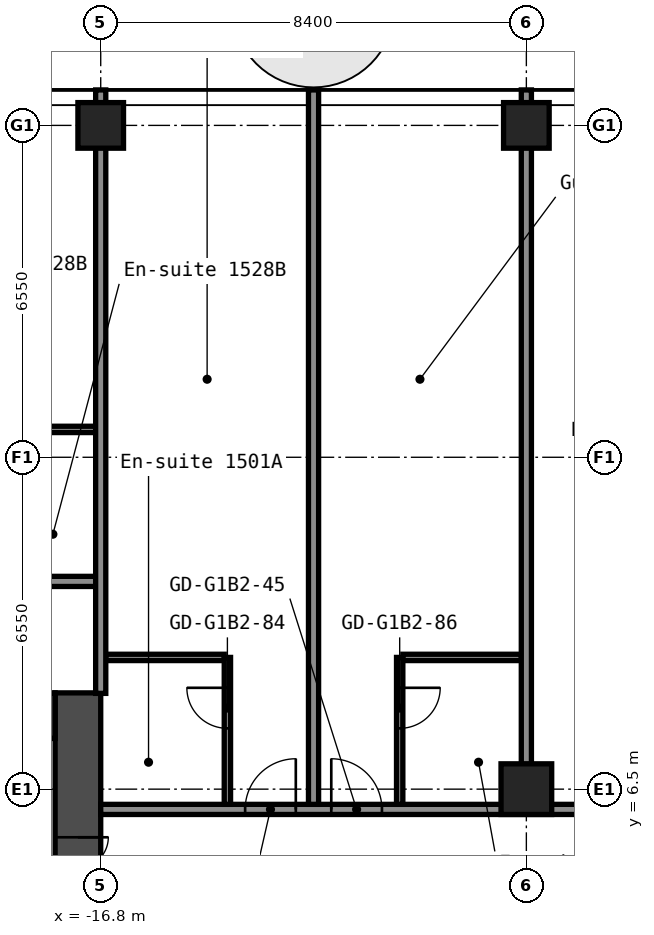
"""IFC4 building model, lengths in metres.
Left out: names, types, materials, properties, quantities, classifications, styles, units other than length and angle.
Written with IfcOpenShell. Run it as: python <this file> out.ifc"""

import sys

from ifc_helpers import new_model, si_unit, direction, frame, frame_2d, origin, origin_2d, place, context, subcontext, project, spatial, rectangle, hollow_rectangle, extrude, element, fill, save


model = new_model("IFC4")
c1 = context("Model", 3, precision=1e-05, world=origin(), true_north=direction((0.0, 1.0)))
c2 = subcontext(c1, "Body", "Model", "MODEL_VIEW")
j1 = project(units=[si_unit("LENGTHUNIT", "METRE"), si_unit("PLANEANGLEUNIT", "RADIAN")], contexts=[c1])
p1 = place(None, origin())
s1 = spatial("IfcSite", under=j1, at=p1, CompositionType="ELEMENT")
p2 = place(p1, origin())
s2 = spatial("IfcBuilding", under=s1, at=p2, CompositionType="ELEMENT")
p3 = place(p2, frame((0.0, 0.0, 55.0)))
s3 = spatial("IfcBuildingStorey", under=s2, at=p3, CompositionType="ELEMENT", Elevation=55.0)
p4 = place(p3, frame((-16.8, 19.6, 0.0), z_axis=(0.0, 0.0, 1.0), x_axis=(1.0, 0.0, 0.0)))
e1 = element("IfcColumn", 1, at=p4, inside=s3, PredefinedType="COLUMN", context=c2, shape_type="SweptSolid", body=[
    extrude(hollow_rectangle(XDim=0.9, YDim=0.9, WallThickness=0.036, at=origin_2d()), origin(), (0.0, 0.0, 1.0), 2.8),
])
p5 = place(p3, frame((-8.4, 6.5, 0.0), z_axis=(0.0, 0.0, 1.0), x_axis=(1.0, 0.0, 0.0)))
e2 = element("IfcColumn", 2, at=p5, inside=s3, PredefinedType="COLUMN", context=c2, shape_type="SweptSolid", body=[
    extrude(hollow_rectangle(XDim=1.0, YDim=1.0, WallThickness=0.04, at=origin_2d()), origin(), (0.0, 0.0, 1.0), 2.8),
])
p6 = place(p3, frame((-8.4, 19.6, 0.0), z_axis=(0.0, 0.0, 1.0), x_axis=(1.0, 0.0, 0.0)))
e3 = element("IfcColumn", 3, at=p6, inside=s3, PredefinedType="COLUMN", context=c2, shape_type="SweptSolid", body=[
    extrude(hollow_rectangle(XDim=0.9, YDim=0.9, WallThickness=0.036, at=origin_2d()), origin(), (0.0, 0.0, 1.0), 2.8),
])
p7 = place(p3, frame((-17.25, -8.4, 0.0), z_axis=(0.0, 0.0, 1.0), x_axis=(0.0, 1.0, 0.0)))
e4 = element("IfcWall", 4, at=p7, inside=s3, PredefinedType="SHEAR", context=c2, shape_type="SweptSolid", body=[
    extrude(rectangle(XDim=16.8, YDim=0.9, at=frame_2d((8.4, 0.0))), origin(), (0.0, 0.0, 1.0), 2.8),
])
p8 = place(p7, frame((12.75, 0.0, 0.0)))
e5 = element("IfcOpeningElement", 5, at=p8, cuts=e4, PredefinedType="OPENING", context=c2, shape_type="SweptSolid", body=[
    extrude(rectangle(XDim=1.2, YDim=2.1, at=frame_2d((0.6, 1.05))), frame((0.0, 0.46, 0.0), z_axis=(0.0, -1.0, 0.0), x_axis=(1.0, 0.0, 0.0)), (0.0, 0.0, 1.0), 0.92),
])
p9 = place(p7, frame((2.85, 0.0, 0.0)))
e6 = element("IfcOpeningElement", 6, at=p9, cuts=e4, PredefinedType="OPENING", context=c2, shape_type="SweptSolid", body=[
    extrude(rectangle(XDim=1.2, YDim=2.1, at=frame_2d((0.6, 1.05))), frame((0.0, 0.46, 0.0), z_axis=(0.0, -1.0, 0.0), x_axis=(1.0, 0.0, 0.0)), (0.0, 0.0, 1.0), 0.92),
])
p10 = place(p3, frame((-32.7, 7.95, 0.0), z_axis=(0.0, 0.0, 1.0), x_axis=(1.0, 0.0, 0.0)))
e7 = element("IfcWall", 7, at=p10, inside=s3, PredefinedType="SHEAR", context=c2, shape_type="SweptSolid", body=[
    extrude(rectangle(XDim=15.0, YDim=0.9, at=frame_2d((7.5, 0.0))), origin(), (0.0, 0.0, 1.0), 2.8),
])
p11 = place(p10, frame((3.4, 0.0, 0.0)))
e8 = element("IfcOpeningElement", 8, at=p11, cuts=e7, PredefinedType="OPENING", context=c2, shape_type="SweptSolid", body=[
    extrude(rectangle(XDim=1.2, YDim=2.1, at=frame_2d((0.6, 1.05))), frame((0.0, 0.46, 0.0), z_axis=(0.0, -1.0, 0.0), x_axis=(1.0, 0.0, 0.0)), (0.0, 0.0, 1.0), 0.92),
])
p12 = place(p10, frame((0.75, 0.0, 0.0)))
e9 = element("IfcOpeningElement", 9, at=p12, cuts=e7, PredefinedType="OPENING", context=c2, shape_type="SweptSolid", body=[
    extrude(rectangle(XDim=0.9, YDim=2.1, at=frame_2d((0.45, 1.05))), frame((0.0, 0.46, 0.0), z_axis=(0.0, -1.0, 0.0), x_axis=(1.0, 0.0, 0.0)), (0.0, 0.0, 1.0), 0.92),
])
p13 = place(p3, frame((-16.8, 6.1, 0.0), z_axis=(0.0, 0.0, 1.0), x_axis=(1.0, 0.0, 0.0)))
e10 = element("IfcWall", 10, at=p13, inside=s3, PredefinedType="PARTITIONING", context=c2, shape_type="SweptSolid", body=[
    extrude(rectangle(XDim=33.6, YDim=0.2, at=frame_2d((16.8, 0.0))), origin(), (0.0, 0.0, 1.0), 2.8),
])
p14 = place(p13, frame((2.85, 0.0, 0.0)))
e11 = element("IfcOpeningElement", 11, at=p14, cuts=e10, PredefinedType="OPENING", context=c2, shape_type="SweptSolid", body=[
    extrude(rectangle(XDim=1.0, YDim=2.1, at=frame_2d((0.5, 1.05))), frame((0.0, 0.11, 0.0), z_axis=(0.0, -1.0, 0.0), x_axis=(1.0, 0.0, 0.0)), (0.0, 0.0, 1.0), 0.22),
])
p15 = place(p13, frame((4.55, 0.0, 0.0)))
e12 = element("IfcOpeningElement", 12, at=p15, cuts=e10, PredefinedType="OPENING", context=c2, shape_type="SweptSolid", body=[
    extrude(rectangle(XDim=1.0, YDim=2.1, at=frame_2d((0.5, 1.05))), frame((0.0, 0.11, 0.0), z_axis=(0.0, -1.0, 0.0), x_axis=(1.0, 0.0, 0.0)), (0.0, 0.0, 1.0), 0.22),
])
p16 = place(p13, frame((10.555, 0.0, 0.0)))
e13 = element("IfcOpeningElement", 13, at=p16, cuts=e10, PredefinedType="OPENING", context=c2, shape_type="SweptSolid", body=[
    extrude(rectangle(XDim=0.9, YDim=2.1, at=frame_2d((0.45, 1.05))), frame((0.0, 0.11, 0.0), z_axis=(0.0, -1.0, 0.0), x_axis=(1.0, 0.0, 0.0)), (0.0, 0.0, 1.0), 0.22),
])
p17 = place(p13, frame((14.755, 0.0, 0.0)))
e14 = element("IfcOpeningElement", 14, at=p17, cuts=e10, PredefinedType="OPENING", context=c2, shape_type="SweptSolid", body=[
    extrude(rectangle(XDim=0.9, YDim=2.1, at=frame_2d((0.45, 1.05))), frame((0.0, 0.11, 0.0), z_axis=(0.0, -1.0, 0.0), x_axis=(1.0, 0.0, 0.0)), (0.0, 0.0, 1.0), 0.22),
])
p18 = place(p13, frame((19.65, 0.0, 0.0)))
e15 = element("IfcOpeningElement", 15, at=p18, cuts=e10, PredefinedType="OPENING", context=c2, shape_type="SweptSolid", body=[
    extrude(rectangle(XDim=1.0, YDim=2.1, at=frame_2d((0.5, 1.05))), frame((0.0, 0.11, 0.0), z_axis=(0.0, -1.0, 0.0), x_axis=(1.0, 0.0, 0.0)), (0.0, 0.0, 1.0), 0.22),
])
p19 = place(p13, frame((21.35, 0.0, 0.0)))
e16 = element("IfcOpeningElement", 16, at=p19, cuts=e10, PredefinedType="OPENING", context=c2, shape_type="SweptSolid", body=[
    extrude(rectangle(XDim=1.0, YDim=2.1, at=frame_2d((0.5, 1.05))), frame((0.0, 0.11, 0.0), z_axis=(0.0, -1.0, 0.0), x_axis=(1.0, 0.0, 0.0)), (0.0, 0.0, 1.0), 0.22),
])
p20 = place(p13, frame((28.05, 0.0, 0.0)))
e17 = element("IfcOpeningElement", 17, at=p20, cuts=e10, PredefinedType="OPENING", context=c2, shape_type="SweptSolid", body=[
    extrude(rectangle(XDim=1.0, YDim=2.1, at=frame_2d((0.5, 1.05))), frame((0.0, 0.11, 0.0), z_axis=(0.0, -1.0, 0.0), x_axis=(1.0, 0.0, 0.0)), (0.0, 0.0, 1.0), 0.22),
])
p21 = place(p13, frame((29.75, 0.0, 0.0)))
e18 = element("IfcOpeningElement", 18, at=p21, cuts=e10, PredefinedType="OPENING", context=c2, shape_type="SweptSolid", body=[
    extrude(rectangle(XDim=1.0, YDim=2.1, at=frame_2d((0.5, 1.05))), frame((0.0, 0.11, 0.0), z_axis=(0.0, -1.0, 0.0), x_axis=(1.0, 0.0, 0.0)), (0.0, 0.0, 1.0), 0.22),
])
for number, where, z_axis, x_axis in (
    (19, (-16.7, 9.1, 0.0), (0.0, 0.0, 1.0), (1.0, 0.0, 0.0)),
    (20, (-10.837, 9.1, 0.0), (0.0, 0.0, 1.0), (1.0, 0.0, 0.0)),
):
    element("IfcWall", number, at=place(p3, frame(where, z_axis=z_axis, x_axis=x_axis)), inside=s3, PredefinedType="PARTITIONING", context=c2, shape_type="SweptSolid", body=[
        extrude(rectangle(XDim=2.337, YDim=0.125, at=frame_2d((1.169, 0.0))), origin(), (0.0, 0.0, 1.0), 2.8),
    ])
p22 = place(p3, frame((-51.1, 10.6, 0.0), z_axis=(0.0, 0.0, 1.0), x_axis=(1.0, 0.0, 0.0)))
e21 = element("IfcWall", 21, at=p22, inside=s3, PredefinedType="PARTITIONING", context=c2, shape_type="SweptSolid", body=[
    extrude(rectangle(XDim=34.3, YDim=0.2, at=frame_2d((17.15, 0.0))), origin(), (0.0, 0.0, 1.0), 2.8),
])
p23 = place(p22, frame((3.25, 0.0, 0.0)))
e22 = element("IfcOpeningElement", 22, at=p23, cuts=e21, PredefinedType="OPENING", context=c2, shape_type="SweptSolid", body=[
    extrude(rectangle(XDim=1.0, YDim=2.1, at=frame_2d((0.5, 1.05))), frame((0.0, 0.11, 0.0), z_axis=(0.0, -1.0, 0.0), x_axis=(1.0, 0.0, 0.0)), (0.0, 0.0, 1.0), 0.22),
])
p24 = place(p22, frame((5.15, 0.0, 0.0)))
e23 = element("IfcOpeningElement", 23, at=p24, cuts=e21, PredefinedType="OPENING", context=c2, shape_type="SweptSolid", body=[
    extrude(rectangle(XDim=1.0, YDim=2.1, at=frame_2d((0.5, 1.05))), frame((0.0, 0.11, 0.0), z_axis=(0.0, -1.0, 0.0), x_axis=(1.0, 0.0, 0.0)), (0.0, 0.0, 1.0), 0.22),
])
p25 = place(p22, frame((11.95, 0.0, 0.0)))
e24 = element("IfcOpeningElement", 24, at=p25, cuts=e21, PredefinedType="OPENING", context=c2, shape_type="SweptSolid", body=[
    extrude(rectangle(XDim=1.0, YDim=2.1, at=frame_2d((0.5, 1.05))), frame((0.0, 0.11, 0.0), z_axis=(0.0, -1.0, 0.0), x_axis=(1.0, 0.0, 0.0)), (0.0, 0.0, 1.0), 0.22),
])
p26 = place(p22, frame((13.65, 0.0, 0.0)))
e25 = element("IfcOpeningElement", 25, at=p26, cuts=e21, PredefinedType="OPENING", context=c2, shape_type="SweptSolid", body=[
    extrude(rectangle(XDim=1.0, YDim=2.1, at=frame_2d((0.5, 1.05))), frame((0.0, 0.11, 0.0), z_axis=(0.0, -1.0, 0.0), x_axis=(1.0, 0.0, 0.0)), (0.0, 0.0, 1.0), 0.22),
])
p27 = place(p22, frame((20.35, 0.0, 0.0)))
e26 = element("IfcOpeningElement", 26, at=p27, cuts=e21, PredefinedType="OPENING", context=c2, shape_type="SweptSolid", body=[
    extrude(rectangle(XDim=1.0, YDim=2.1, at=frame_2d((0.5, 1.05))), frame((0.0, 0.11, 0.0), z_axis=(0.0, -1.0, 0.0), x_axis=(1.0, 0.0, 0.0)), (0.0, 0.0, 1.0), 0.22),
])
p28 = place(p22, frame((22.05, 0.0, 0.0)))
e27 = element("IfcOpeningElement", 27, at=p28, cuts=e21, PredefinedType="OPENING", context=c2, shape_type="SweptSolid", body=[
    extrude(rectangle(XDim=1.0, YDim=2.1, at=frame_2d((0.5, 1.05))), frame((0.0, 0.11, 0.0), z_axis=(0.0, -1.0, 0.0), x_axis=(1.0, 0.0, 0.0)), (0.0, 0.0, 1.0), 0.22),
])
p29 = place(p22, frame((28.75, 0.0, 0.0)))
e28 = element("IfcOpeningElement", 28, at=p29, cuts=e21, PredefinedType="OPENING", context=c2, shape_type="SweptSolid", body=[
    extrude(rectangle(XDim=1.0, YDim=2.1, at=frame_2d((0.5, 1.05))), frame((0.0, 0.11, 0.0), z_axis=(0.0, -1.0, 0.0), x_axis=(1.0, 0.0, 0.0)), (0.0, 0.0, 1.0), 0.22),
])
p30 = place(p22, frame((30.45, 0.0, 0.0)))
e29 = element("IfcOpeningElement", 29, at=p30, cuts=e21, PredefinedType="OPENING", context=c2, shape_type="SweptSolid", body=[
    extrude(rectangle(XDim=1.0, YDim=2.1, at=frame_2d((0.5, 1.05))), frame((0.0, 0.11, 0.0), z_axis=(0.0, -1.0, 0.0), x_axis=(1.0, 0.0, 0.0)), (0.0, 0.0, 1.0), 0.22),
])
p31 = place(p3, frame((-19.238, 13.6, 0.0), z_axis=(0.0, 0.0, 1.0), x_axis=(1.0, 0.0, 0.0)))
e30 = element("IfcWall", 30, at=p31, inside=s3, PredefinedType="PARTITIONING", context=c2, shape_type="SweptSolid", body=[
    extrude(rectangle(XDim=2.338, YDim=0.125, at=frame_2d((1.169, 0.0))), origin(), (0.0, 0.0, 1.0), 2.8),
])
p32 = place(p3, frame((-16.8, 8.39, 0.0), z_axis=(0.0, 0.0, 1.0), x_axis=(0.0, 1.0, 0.0)))
e31 = element("IfcWall", 31, at=p32, inside=s3, PredefinedType="PARTITIONING", context=c2, shape_type="SweptSolid", body=[
    extrude(rectangle(XDim=11.91, YDim=0.2, at=frame_2d((5.955, 0.0))), origin(), (0.0, 0.0, 1.0), 2.8),
])
p33 = place(p3, frame((-14.3, 6.2, 0.0), z_axis=(0.0, 0.0, 1.0), x_axis=(0.0, 1.0, 0.0)))
e32 = element("IfcWall", 32, at=p33, inside=s3, PredefinedType="PARTITIONING", context=c2, shape_type="SweptSolid", body=[
    extrude(rectangle(XDim=2.9, YDim=0.125, at=frame_2d((1.45, 0.0))), origin(), (0.0, 0.0, 1.0), 2.8),
])
p34 = place(p33, frame((1.5, 0.0, 0.0)))
e33 = element("IfcOpeningElement", 33, at=p34, cuts=e32, PredefinedType="OPENING", context=c2, shape_type="SweptSolid", body=[
    extrude(rectangle(XDim=0.8, YDim=2.1, at=frame_2d((0.4, 1.05))), frame((0.0, 0.073, 0.0), z_axis=(0.0, -1.0, 0.0), x_axis=(1.0, 0.0, 0.0)), (0.0, 0.0, 1.0), 0.145),
])
p35 = place(p3, frame((-12.6, 6.2, 0.0), z_axis=(0.0, 0.0, 1.0), x_axis=(0.0, 1.0, 0.0)))
e34 = element("IfcWall", 34, at=p35, inside=s3, PredefinedType="PARTITIONING", context=c2, shape_type="SweptSolid", body=[
    extrude(rectangle(XDim=14.1, YDim=0.2, at=frame_2d((7.05, 0.0))), origin(), (0.0, 0.0, 1.0), 2.8),
])
p36 = place(p3, frame((-10.9, 6.2, 0.0), z_axis=(0.0, 0.0, 1.0), x_axis=(0.0, 1.0, 0.0)))
e35 = element("IfcWall", 35, at=p36, inside=s3, PredefinedType="PARTITIONING", context=c2, shape_type="SweptSolid", body=[
    extrude(rectangle(XDim=2.9, YDim=0.125, at=frame_2d((1.45, 0.0))), origin(), (0.0, 0.0, 1.0), 2.8),
])
p37 = place(p36, frame((1.5, 0.0, 0.0)))
e36 = element("IfcOpeningElement", 36, at=p37, cuts=e35, PredefinedType="OPENING", context=c2, shape_type="SweptSolid", body=[
    extrude(rectangle(XDim=0.8, YDim=2.1, at=frame_2d((0.4, 1.05))), frame((0.0, 0.073, 0.0), z_axis=(0.0, -1.0, 0.0), x_axis=(1.0, 0.0, 0.0)), (0.0, 0.0, 1.0), 0.145),
])
p38 = place(p3, frame((-8.4, 6.99, 0.0), z_axis=(0.0, 0.0, 1.0), x_axis=(0.0, 1.0, 0.0)))
e37 = element("IfcWall", 37, at=p38, inside=s3, PredefinedType="PARTITIONING", context=c2, shape_type="SweptSolid", body=[
    extrude(rectangle(XDim=13.31, YDim=0.2, at=frame_2d((6.655, 0.0))), origin(), (0.0, 0.0, 1.0), 2.8),
])
p39 = place(p8, origin())
e38 = element("IfcDoor", 38, at=p39, inside=s3, OperationType="DOUBLE_DOOR_SINGLE_SWING", PredefinedType="DOOR", context=c2, shape_type="SweptSolid", body=[
    extrude(rectangle(XDim=1.2, YDim=2.1, at=frame_2d((0.6, 1.05))), frame((0.0, 0.025, 0.0), z_axis=(0.0, -1.0, 0.0), x_axis=(1.0, 0.0, 0.0)), (0.0, 0.0, 1.0), 0.05),
])
fill(e5, e38)
p40 = place(p14, origin())
e39 = element("IfcDoor", 39, at=p40, inside=s3, OperationType="SINGLE_SWING_LEFT", PredefinedType="DOOR", context=c2, shape_type="SweptSolid", body=[
    extrude(rectangle(XDim=1.0, YDim=2.1, at=frame_2d((0.5, 1.05))), frame((0.0, 0.025, 0.0), z_axis=(0.0, -1.0, 0.0), x_axis=(1.0, 0.0, 0.0)), (0.0, 0.0, 1.0), 0.05),
])
fill(e11, e39)
p41 = place(p15, origin())
e40 = element("IfcDoor", 40, at=p41, inside=s3, OperationType="SINGLE_SWING_RIGHT", PredefinedType="DOOR", context=c2, shape_type="SweptSolid", body=[
    extrude(rectangle(XDim=1.0, YDim=2.1, at=frame_2d((0.5, 1.05))), frame((0.0, 0.025, 0.0), z_axis=(0.0, -1.0, 0.0), x_axis=(1.0, 0.0, 0.0)), (0.0, 0.0, 1.0), 0.05),
])
fill(e12, e40)
p42 = place(p34, origin())
e41 = element("IfcDoor", 41, at=p42, inside=s3, OperationType="SINGLE_SWING_LEFT", PredefinedType="DOOR", context=c2, shape_type="SweptSolid", body=[
    extrude(rectangle(XDim=0.8, YDim=2.1, at=frame_2d((0.4, 1.05))), frame((0.0, 0.025, 0.0), z_axis=(0.0, -1.0, 0.0), x_axis=(1.0, 0.0, 0.0)), (0.0, 0.0, 1.0), 0.05),
])
fill(e33, e41)
p43 = place(p37, origin())
e42 = element("IfcDoor", 42, at=p43, inside=s3, OperationType="SINGLE_SWING_RIGHT", PredefinedType="DOOR", context=c2, shape_type="SweptSolid", body=[
    extrude(rectangle(XDim=0.8, YDim=2.1, at=frame_2d((0.4, 1.05))), frame((0.0, 0.025, 0.0), z_axis=(0.0, -1.0, 0.0), x_axis=(1.0, 0.0, 0.0)), (0.0, 0.0, 1.0), 0.05),
])
fill(e36, e42)
save(model, sys.argv[1])
